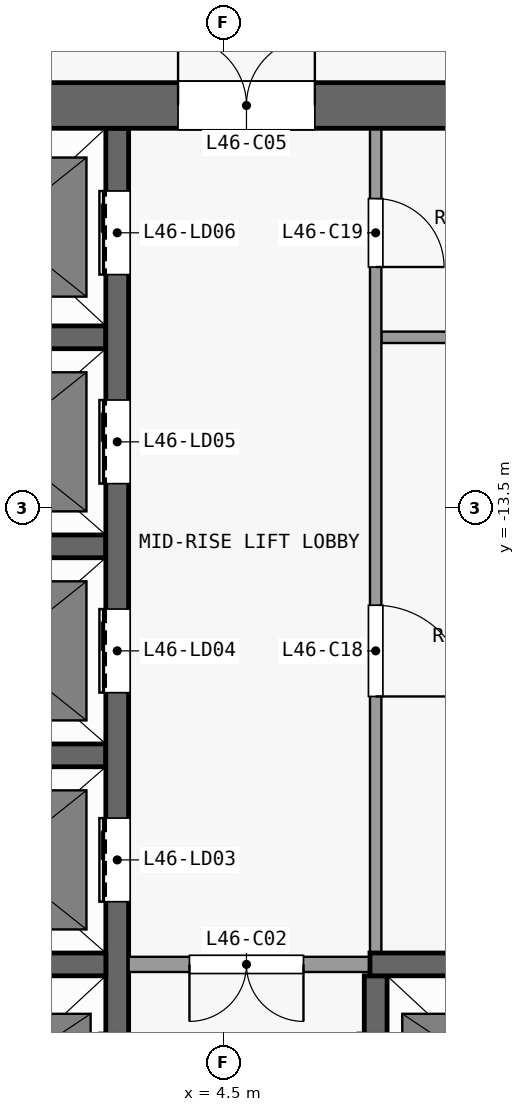
"""IFC4 building model, lengths in metres.
Left out: names, types, materials, properties, quantities, classifications, styles, units other than length and angle.
Written with IfcOpenShell. Run it as: python <this file> out.ifc"""

import sys

from ifc_helpers import new_model, si_unit, direction, frame, frame_2d, origin, place, context, subcontext, project, spatial, rectangle, extrude, element, fill, save


model = new_model("IFC4")
c1 = context("Model", 3, precision=1e-05, world=origin(), true_north=direction((0.0, 1.0)))
c2 = subcontext(c1, "Body", "Model", "MODEL_VIEW")
j1 = project(units=[si_unit("LENGTHUNIT", "METRE"), si_unit("PLANEANGLEUNIT", "RADIAN")], contexts=[c1])
p1 = place(None, origin())
s1 = spatial("IfcSite", under=j1, at=p1, CompositionType="ELEMENT")
p2 = place(p1, origin())
s2 = spatial("IfcBuilding", under=s1, at=p2, CompositionType="ELEMENT")
p3 = place(p2, frame((0.0, 0.0, 185.3)))
s3 = spatial("IfcBuildingStorey", under=s2, at=p3, CompositionType="ELEMENT", Elevation=185.3)
p4 = place(p3, frame((-13.3, -8.2, 0.0), z_axis=(0.0, 0.0, 1.0), x_axis=(1.0, 0.0, 0.0)))
e1 = element("IfcWall", 1, at=p4, inside=s3, PredefinedType="SHEAR", context=c2, shape_type="SweptSolid", body=[
    extrude(rectangle(XDim=26.6, YDim=0.6, at=frame_2d((13.3, 0.0))), origin(), (0.0, 0.0, 1.0), 3.3),
])
p5 = place(p4, frame((7.6, 0.0, 0.0)))
e2 = element("IfcOpeningElement", 2, at=p5, cuts=e1, PredefinedType="OPENING", context=c2, shape_type="SweptSolid", body=[
    extrude(rectangle(XDim=1.8, YDim=2.1, at=frame_2d((0.9, 1.05))), frame((0.0, 0.31, 0.0), z_axis=(0.0, -1.0, 0.0), x_axis=(1.0, 0.0, 0.0)), (0.0, 0.0, 1.0), 0.62),
])
p6 = place(p4, frame((17.2, 0.0, 0.0)))
e3 = element("IfcOpeningElement", 3, at=p6, cuts=e1, PredefinedType="OPENING", context=c2, shape_type="SweptSolid", body=[
    extrude(rectangle(XDim=1.8, YDim=2.1, at=frame_2d((0.9, 1.05))), frame((0.0, 0.31, 0.0), z_axis=(0.0, -1.0, 0.0), x_axis=(1.0, 0.0, 0.0)), (0.0, 0.0, 1.0), 0.62),
])
p7 = place(p4, frame((2.525, 0.0, 0.0)))
e4 = element("IfcOpeningElement", 4, at=p7, cuts=e1, PredefinedType="OPENING", context=c2, shape_type="SweptSolid", body=[
    extrude(rectangle(XDim=0.9, YDim=2.1, at=frame_2d((0.45, 1.05))), frame((0.0, 0.31, 0.0), z_axis=(0.0, -1.0, 0.0), x_axis=(1.0, 0.0, 0.0)), (0.0, 0.0, 1.0), 0.62),
])
p8 = place(p4, frame((23.175, 0.0, 0.0)))
e5 = element("IfcOpeningElement", 5, at=p8, cuts=e1, PredefinedType="OPENING", context=c2, shape_type="SweptSolid", body=[
    extrude(rectangle(XDim=0.9, YDim=2.1, at=frame_2d((0.45, 1.05))), frame((0.0, 0.31, 0.0), z_axis=(0.0, -1.0, 0.0), x_axis=(1.0, 0.0, 0.0)), (0.0, 0.0, 1.0), 0.62),
])
p9 = place(p3, frame((0.15, -19.5, 0.0), z_axis=(0.0, 0.0, 1.0), x_axis=(1.0, 0.0, 0.0)))
e6 = element("IfcWall", 6, at=p9, inside=s3, PredefinedType="SHEAR", context=c2, shape_type="SweptSolid", body=[
    extrude(rectangle(XDim=2.8, YDim=0.3, at=frame_2d((1.4, 0.0))), origin(), (0.0, 0.0, 1.0), 3.3),
])
p10 = place(p3, frame((6.575, -19.5, 0.0), z_axis=(0.0, 0.0, 1.0), x_axis=(-1.0, 0.0, 0.0)))
e7 = element("IfcWall", 7, at=p10, inside=s3, PredefinedType="PARTITIONING", context=c2, shape_type="SweptSolid", body=[
    extrude(rectangle(XDim=3.325, YDim=0.2, at=frame_2d((1.663, 0.0))), origin(), (0.0, 0.0, 1.0), 3.3),
])
p11 = place(p10, frame((1.025, 0.0, 0.0)))
e8 = element("IfcOpeningElement", 8, at=p11, cuts=e7, PredefinedType="OPENING", context=c2, shape_type="SweptSolid", body=[
    extrude(rectangle(XDim=1.5, YDim=2.1, at=frame_2d((0.75, 1.05))), frame((0.0, 0.11, 0.0), z_axis=(0.0, -1.0, 0.0), x_axis=(1.0, 0.0, 0.0)), (0.0, 0.0, 1.0), 0.22),
])
p12 = place(p3, frame((6.425, -19.5, 0.0), z_axis=(0.0, 0.0, 1.0), x_axis=(1.0, 0.0, 0.0)))
e9 = element("IfcWall", 9, at=p12, inside=s3, PredefinedType="SHEAR", context=c2, shape_type="SweptSolid", body=[
    extrude(rectangle(XDim=3.025, YDim=0.3, at=frame_2d((1.512, 0.0))), origin(), (0.0, 0.0, 1.0), 3.3),
])
for number, where, z_axis, x_axis in (
    (10, (0.15, -16.75, 0.0), (0.0, 0.0, 1.0), (1.0, 0.0, 0.0)),
    (11, (0.15, -14.0, 0.0), (0.0, 0.0, 1.0), (1.0, 0.0, 0.0)),
    (12, (0.15, -11.25, 0.0), (0.0, 0.0, 1.0), (1.0, 0.0, 0.0)),
):
    element("IfcWall", number, at=place(p3, frame(where, z_axis=z_axis, x_axis=x_axis)), inside=s3, PredefinedType="SHEAR", context=c2, shape_type="SweptSolid", body=[
        extrude(rectangle(XDim=2.8, YDim=0.3, at=frame_2d((1.4, 0.0))), origin(), (0.0, 0.0, 1.0), 3.3),
    ])
p13 = place(p3, frame((6.575, -11.25, 0.0), z_axis=(0.0, 0.0, 1.0), x_axis=(1.0, 0.0, 0.0)))
e13 = element("IfcWall", 13, at=p13, inside=s3, PredefinedType="PARTITIONING", context=c2, shape_type="SweptSolid", body=[
    extrude(rectangle(XDim=2.925, YDim=0.15, at=frame_2d((1.462, 0.0))), origin(), (0.0, 0.0, 1.0), 3.3),
])
p14 = place(p3, frame((3.1, -22.55, 0.0), z_axis=(0.0, 0.0, 1.0), x_axis=(0.0, 1.0, 0.0)))
e14 = element("IfcWall", 14, at=p14, inside=s3, PredefinedType="SHEAR", context=c2, shape_type="SweptSolid", body=[
    extrude(rectangle(XDim=14.05, YDim=0.3, at=frame_2d((7.025, 0.0))), origin(), (0.0, 0.0, 1.0), 3.3),
])
p15 = place(p14, frame((1.05, 0.0, 0.0)))
e15 = element("IfcOpeningElement", 15, at=p15, cuts=e14, PredefinedType="OPENING", context=c2, shape_type="SweptSolid", body=[
    extrude(rectangle(XDim=1.1, YDim=2.1, at=frame_2d((0.55, 1.05))), frame((0.0, 0.16, 0.0), z_axis=(0.0, -1.0, 0.0), x_axis=(1.0, 0.0, 0.0)), (0.0, 0.0, 1.0), 0.32),
])
p16 = place(p14, frame((3.875, 0.0, 0.0)))
e16 = element("IfcOpeningElement", 16, at=p16, cuts=e14, PredefinedType="OPENING", context=c2, shape_type="SweptSolid", body=[
    extrude(rectangle(XDim=1.1, YDim=2.1, at=frame_2d((0.55, 1.05))), frame((0.0, 0.16, 0.0), z_axis=(0.0, -1.0, 0.0), x_axis=(1.0, 0.0, 0.0)), (0.0, 0.0, 1.0), 0.32),
])
p17 = place(p14, frame((6.625, 0.0, 0.0)))
e17 = element("IfcOpeningElement", 17, at=p17, cuts=e14, PredefinedType="OPENING", context=c2, shape_type="SweptSolid", body=[
    extrude(rectangle(XDim=1.1, YDim=2.1, at=frame_2d((0.55, 1.05))), frame((0.0, 0.16, 0.0), z_axis=(0.0, -1.0, 0.0), x_axis=(1.0, 0.0, 0.0)), (0.0, 0.0, 1.0), 0.32),
])
p18 = place(p14, frame((9.375, 0.0, 0.0)))
e18 = element("IfcOpeningElement", 18, at=p18, cuts=e14, PredefinedType="OPENING", context=c2, shape_type="SweptSolid", body=[
    extrude(rectangle(XDim=1.1, YDim=2.1, at=frame_2d((0.55, 1.05))), frame((0.0, 0.16, 0.0), z_axis=(0.0, -1.0, 0.0), x_axis=(1.0, 0.0, 0.0)), (0.0, 0.0, 1.0), 0.32),
])
p19 = place(p14, frame((12.125, 0.0, 0.0)))
e19 = element("IfcOpeningElement", 19, at=p19, cuts=e14, PredefinedType="OPENING", context=c2, shape_type="SweptSolid", body=[
    extrude(rectangle(XDim=1.1, YDim=2.1, at=frame_2d((0.55, 1.05))), frame((0.0, 0.16, 0.0), z_axis=(0.0, -1.0, 0.0), x_axis=(1.0, 0.0, 0.0)), (0.0, 0.0, 1.0), 0.32),
])
p20 = place(p3, frame((6.5, -22.25, 0.0), z_axis=(0.0, 0.0, 1.0), x_axis=(0.0, 1.0, 0.0)))
e20 = element("IfcWall", 20, at=p20, inside=s3, PredefinedType="SHEAR", context=c2, shape_type="SweptSolid", body=[
    extrude(rectangle(XDim=2.6, YDim=0.3, at=frame_2d((1.3, 0.0))), origin(), (0.0, 0.0, 1.0), 3.3),
])
p21 = place(p20, frame((0.75, 0.0, 0.0)))
e21 = element("IfcOpeningElement", 21, at=p21, cuts=e20, PredefinedType="OPENING", context=c2, shape_type="SweptSolid", body=[
    extrude(rectangle(XDim=1.1, YDim=2.1, at=frame_2d((0.55, 1.05))), frame((0.0, 0.16, 0.0), z_axis=(0.0, -1.0, 0.0), x_axis=(1.0, 0.0, 0.0)), (0.0, 0.0, 1.0), 0.32),
])
p22 = place(p3, frame((6.5, -8.5, 0.0), z_axis=(0.0, 0.0, 1.0), x_axis=(0.0, -1.0, 0.0)))
e22 = element("IfcWall", 22, at=p22, inside=s3, PredefinedType="PARTITIONING", context=c2, shape_type="SweptSolid", body=[
    extrude(rectangle(XDim=10.85, YDim=0.15, at=frame_2d((5.425, 0.0))), origin(), (0.0, 0.0, 1.0), 3.3),
])
p23 = place(p22, frame((6.275, 0.0, 0.0)))
e23 = element("IfcOpeningElement", 23, at=p23, cuts=e22, PredefinedType="OPENING", context=c2, shape_type="SweptSolid", body=[
    extrude(rectangle(XDim=1.2, YDim=2.1, at=frame_2d((0.6, 1.05))), frame((0.0, 0.085, 0.0), z_axis=(0.0, -1.0, 0.0), x_axis=(1.0, 0.0, 0.0)), (0.0, 0.0, 1.0), 0.17),
])
p24 = place(p22, frame((0.925, 0.0, 0.0)))
e24 = element("IfcOpeningElement", 24, at=p24, cuts=e22, PredefinedType="OPENING", context=c2, shape_type="SweptSolid", body=[
    extrude(rectangle(XDim=0.9, YDim=2.1, at=frame_2d((0.45, 1.05))), frame((0.0, 0.085, 0.0), z_axis=(0.0, -1.0, 0.0), x_axis=(1.0, 0.0, 0.0)), (0.0, 0.0, 1.0), 0.17),
])
p25 = place(p16, origin())
e25 = element("IfcDoor", 25, at=p25, inside=s3, OperationType="DOUBLE_DOOR_SLIDING", PredefinedType="DOOR", context=c2, shape_type="SweptSolid", body=[
    extrude(rectangle(XDim=1.1, YDim=2.1, at=frame_2d((0.55, 1.05))), frame((0.0, 0.025, 0.0), z_axis=(0.0, -1.0, 0.0), x_axis=(1.0, 0.0, 0.0)), (0.0, 0.0, 1.0), 0.05),
])
fill(e16, e25)
p26 = place(p17, origin())
e26 = element("IfcDoor", 26, at=p26, inside=s3, OperationType="DOUBLE_DOOR_SLIDING", PredefinedType="DOOR", context=c2, shape_type="SweptSolid", body=[
    extrude(rectangle(XDim=1.1, YDim=2.1, at=frame_2d((0.55, 1.05))), frame((0.0, 0.025, 0.0), z_axis=(0.0, -1.0, 0.0), x_axis=(1.0, 0.0, 0.0)), (0.0, 0.0, 1.0), 0.05),
])
fill(e17, e26)
p27 = place(p18, origin())
e27 = element("IfcDoor", 27, at=p27, inside=s3, OperationType="DOUBLE_DOOR_SLIDING", PredefinedType="DOOR", context=c2, shape_type="SweptSolid", body=[
    extrude(rectangle(XDim=1.1, YDim=2.1, at=frame_2d((0.55, 1.05))), frame((0.0, 0.025, 0.0), z_axis=(0.0, -1.0, 0.0), x_axis=(1.0, 0.0, 0.0)), (0.0, 0.0, 1.0), 0.05),
])
fill(e18, e27)
p28 = place(p19, origin())
e28 = element("IfcDoor", 28, at=p28, inside=s3, OperationType="DOUBLE_DOOR_SLIDING", PredefinedType="DOOR", context=c2, shape_type="SweptSolid", body=[
    extrude(rectangle(XDim=1.1, YDim=2.1, at=frame_2d((0.55, 1.05))), frame((0.0, 0.025, 0.0), z_axis=(0.0, -1.0, 0.0), x_axis=(1.0, 0.0, 0.0)), (0.0, 0.0, 1.0), 0.05),
])
fill(e19, e28)
p29 = place(p11, origin())
e29 = element("IfcDoor", 29, at=p29, inside=s3, OperationType="DOUBLE_DOOR_SINGLE_SWING", PredefinedType="DOOR", context=c2, shape_type="SweptSolid", body=[
    extrude(rectangle(XDim=1.5, YDim=2.1, at=frame_2d((0.75, 1.05))), frame((0.0, 0.025, 0.0), z_axis=(0.0, -1.0, 0.0), x_axis=(1.0, 0.0, 0.0)), (0.0, 0.0, 1.0), 0.05),
])
fill(e8, e29)
p30 = place(p6, origin())
e30 = element("IfcDoor", 30, at=p30, inside=s3, OperationType="DOUBLE_DOOR_SINGLE_SWING", PredefinedType="DOOR", context=c2, shape_type="SweptSolid", body=[
    extrude(rectangle(XDim=1.8, YDim=2.1, at=frame_2d((0.9, 1.05))), frame((0.0, 0.025, 0.0), z_axis=(0.0, -1.0, 0.0), x_axis=(1.0, 0.0, 0.0)), (0.0, 0.0, 1.0), 0.05),
])
fill(e3, e30)
p31 = place(p23, origin())
e31 = element("IfcDoor", 31, at=p31, inside=s3, OperationType="SINGLE_SWING_RIGHT", PredefinedType="DOOR", context=c2, shape_type="SweptSolid", body=[
    extrude(rectangle(XDim=1.2, YDim=2.1, at=frame_2d((0.6, 1.05))), frame((0.0, 0.025, 0.0), z_axis=(0.0, -1.0, 0.0), x_axis=(1.0, 0.0, 0.0)), (0.0, 0.0, 1.0), 0.05),
])
fill(e23, e31)
p32 = place(p24, origin())
e32 = element("IfcDoor", 32, at=p32, inside=s3, OperationType="SINGLE_SWING_RIGHT", PredefinedType="DOOR", context=c2, shape_type="SweptSolid", body=[
    extrude(rectangle(XDim=0.9, YDim=2.1, at=frame_2d((0.45, 1.05))), frame((0.0, 0.025, 0.0), z_axis=(0.0, -1.0, 0.0), x_axis=(1.0, 0.0, 0.0)), (0.0, 0.0, 1.0), 0.05),
])
fill(e24, e32)
save(model, sys.argv[1])
